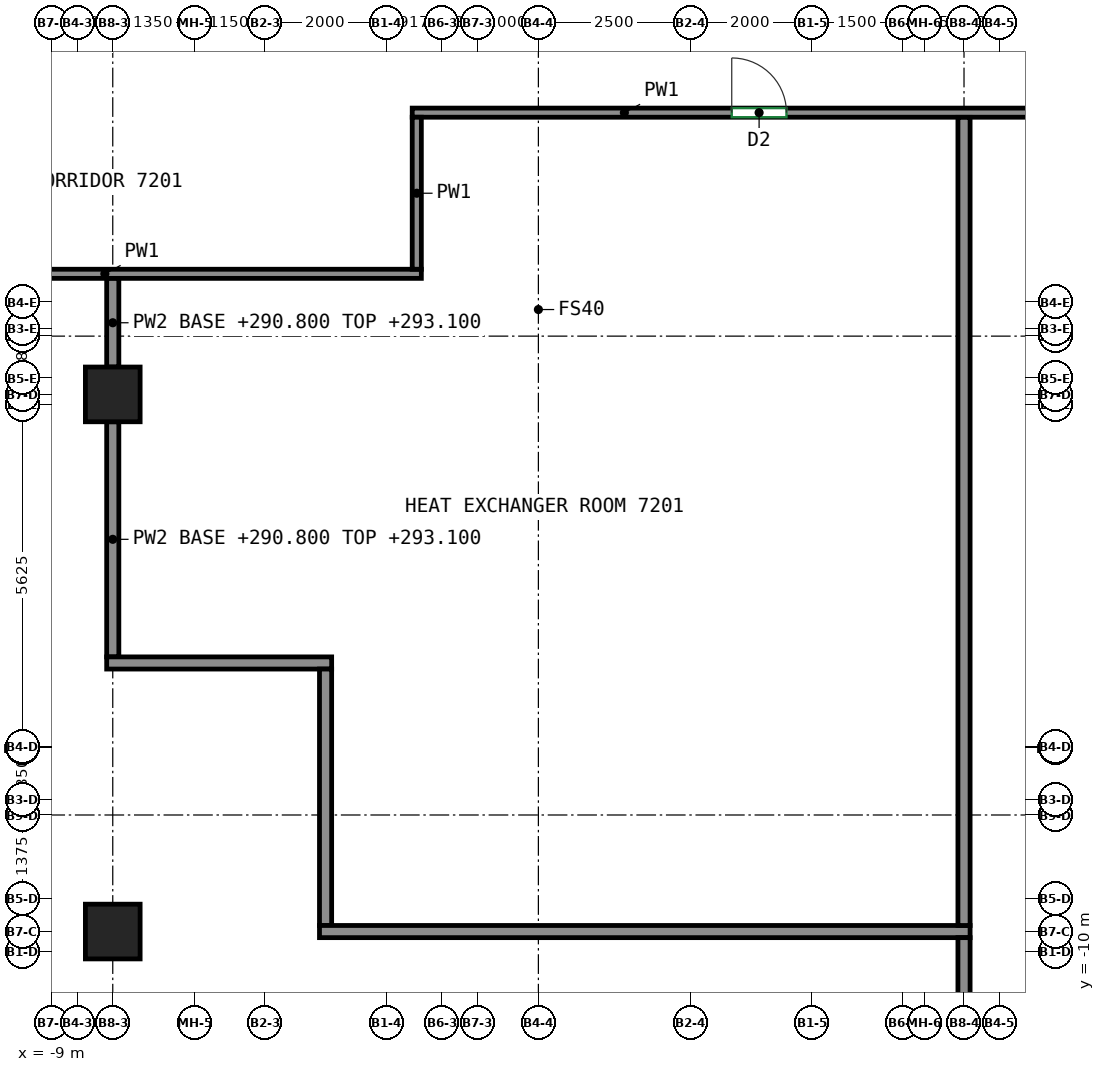
"""IFC4 building model, lengths in metres.
Left out: names, types, materials, properties, quantities, classifications, styles, units other than length and angle.
Written with IfcOpenShell. Run it as: python <this file> out.ifc"""

import sys

from ifc_helpers import new_model, si_unit, direction, frame, frame_2d, origin, origin_2d, place, context, subcontext, project, spatial, rectangle, extrude, source, transform, mapped, element, fill, save


model = new_model("IFC4")
c1 = context("Model", 3, precision=1e-05, world=origin(), true_north=direction((0.0, 1.0)))
c2 = subcontext(c1, "Body", "Model", "MODEL_VIEW")
j1 = project(units=[si_unit("LENGTHUNIT", "METRE"), si_unit("PLANEANGLEUNIT", "RADIAN")], contexts=[c1])
p1 = place(None, origin())
s1 = spatial("IfcSite", under=j1, at=p1, CompositionType="ELEMENT")
p2 = place(p1, origin())
s2 = spatial("IfcBuilding", under=s1, at=p2, CompositionType="ELEMENT")
p3 = place(p2, frame((0.0, 0.0, 290.8)))
s3 = spatial("IfcBuildingStorey", under=s2, at=p3, CompositionType="ELEMENT", Elevation=290.8)
m1 = source(origin(), c2, "Body", "SweptSolid", [
    extrude(rectangle(XDim=0.9, YDim=0.9, at=origin_2d()), origin(), (0.0, 0.0, 1.0), 2.3),
])
for number, where, z_axis, x_axis in (
    (1, (-8.0, -9.667, 0.0), (0.0, 0.0, 1.0), (1.0, 0.0, 0.0)),
    (2, (-8.0, -0.833, 0.0), (0.0, 0.0, 1.0), (1.0, 0.0, 0.0)),
):
    element("IfcColumn", number, at=place(p3, frame(where, z_axis=z_axis, x_axis=x_axis)), inside=s3, PredefinedType="COLUMN", context=c2, shape_type="MappedRepresentation", body=[
        mapped(m1, transform((0.0, 0.0, 0.0))),
    ])
p4 = place(p3, frame((-13.335, 1.15, 0.0), z_axis=(0.0, 0.0, 1.0), x_axis=(1.0, 0.0, 0.0)))
e3 = element("IfcWall", 3, at=p4, inside=s3, PredefinedType="PARTITIONING", context=c2, shape_type="SweptSolid", body=[
    extrude(rectangle(XDim=10.41, YDim=0.15, at=frame_2d((5.205, 0.0))), origin(), (0.0, 0.0, 1.0), 3.8),
])
p5 = place(p3, frame((-3.075, 3.8, 0.0), z_axis=(0.0, 0.0, 1.0), x_axis=(1.0, 0.0, 0.0)))
e4 = element("IfcWall", 4, at=p5, inside=s3, PredefinedType="PARTITIONING", context=c2, shape_type="SweptSolid", body=[
    extrude(rectangle(XDim=11.63, YDim=0.15, at=frame_2d((5.815, 0.0))), origin(), (0.0, 0.0, 1.0), 3.8),
])
p6 = place(p5, frame((5.255, 0.0, 0.0)))
e5 = element("IfcOpeningElement", 5, at=p6, cuts=e4, PredefinedType="OPENING", context=c2, shape_type="SweptSolid", body=[
    extrude(rectangle(XDim=0.9, YDim=2.1, at=frame_2d((0.45, 1.05))), frame((0.0, 0.085, 0.0), z_axis=(0.0, -1.0, 0.0), x_axis=(1.0, 0.0, 0.0)), (0.0, 0.0, 1.0), 0.17),
])
p7 = place(p3, frame((-3.0, 1.225, 0.0), z_axis=(0.0, 0.0, 1.0), x_axis=(0.0, 1.0, 0.0)))
e6 = element("IfcWall", 6, at=p7, inside=s3, PredefinedType="PARTITIONING", context=c2, shape_type="SweptSolid", body=[
    extrude(rectangle(XDim=2.5, YDim=0.15, at=frame_2d((1.25, 0.0))), origin(), (0.0, 0.0, 1.0), 3.8),
])
p8 = place(p3, frame((-8.0, -0.383, 0.0), z_axis=(0.0, 0.0, 1.0), x_axis=(0.0, 1.0, 0.0)))
e7 = element("IfcWall", 7, at=p8, inside=s3, PredefinedType="PARTITIONING", context=c2, shape_type="SweptSolid", body=[
    extrude(rectangle(XDim=1.456, YDim=0.2, at=frame_2d((0.728, 0.0))), origin(), (0.0, 0.0, 1.0), 2.3),
])
p9 = place(p3, frame((-8.0, -5.15, 0.0), z_axis=(0.0, 0.0, 1.0), x_axis=(0.0, 1.0, 0.0)))
e8 = element("IfcWall", 8, at=p9, inside=s3, PredefinedType="PARTITIONING", context=c2, shape_type="SweptSolid", body=[
    extrude(rectangle(XDim=3.867, YDim=0.2, at=frame_2d((1.934, 0.0))), origin(), (0.0, 0.0, 1.0), 2.3),
])
p10 = place(p3, frame((-4.4, -5.25, 0.0), z_axis=(0.0, 0.0, 1.0), x_axis=(-1.0, 0.0, 0.0)))
e9 = element("IfcWall", 9, at=p10, inside=s3, PredefinedType="PARTITIONING", context=c2, shape_type="SweptSolid", body=[
    extrude(rectangle(XDim=3.7, YDim=0.2, at=frame_2d((1.85, 0.0))), origin(), (0.0, 0.0, 1.0), 3.8),
])
p11 = place(p3, frame((-4.5, -9.567, 0.0), z_axis=(0.0, 0.0, 1.0), x_axis=(0.0, 1.0, 0.0)))
e10 = element("IfcWall", 10, at=p11, inside=s3, PredefinedType="PARTITIONING", context=c2, shape_type="SweptSolid", body=[
    extrude(rectangle(XDim=4.217, YDim=0.2, at=frame_2d((2.108, 0.0))), origin(), (0.0, 0.0, 1.0), 3.8),
])
p12 = place(p3, frame((-4.6, -9.667, 0.0), z_axis=(0.0, 0.0, 1.0), x_axis=(1.0, 0.0, 0.0)))
e11 = element("IfcWall", 11, at=p12, inside=s3, PredefinedType="PARTITIONING", context=c2, shape_type="SweptSolid", body=[
    extrude(rectangle(XDim=10.7, YDim=0.2, at=frame_2d((5.35, 0.0))), origin(), (0.0, 0.0, 1.0), 3.8),
])
p13 = place(p3, frame((6.0, -17.725, 0.0), z_axis=(0.0, 0.0, 1.0), x_axis=(0.0, 1.0, 0.0)))
e12 = element("IfcWall", 12, at=p13, inside=s3, PredefinedType="PARTITIONING", context=c2, shape_type="SweptSolid", body=[
    extrude(rectangle(XDim=7.958, YDim=0.2, at=frame_2d((3.979, 0.0))), origin(), (0.0, 0.0, 1.0), 3.8),
])
p14 = place(p3, frame((6.0, -9.567, 0.0), z_axis=(0.0, 0.0, 1.0), x_axis=(0.0, 1.0, 0.0)))
e13 = element("IfcWall", 13, at=p14, inside=s3, PredefinedType="PARTITIONING", context=c2, shape_type="SweptSolid", body=[
    extrude(rectangle(XDim=13.29, YDim=0.2, at=frame_2d((6.645, 0.0))), origin(), (0.0, 0.0, 1.0), 3.8),
])
p15 = place(p6, origin())
e14 = element("IfcDoor", 14, at=p15, inside=s3, OperationType="SINGLE_SWING_LEFT", PredefinedType="DOOR", context=c2, shape_type="SweptSolid", body=[
    extrude(rectangle(XDim=0.9, YDim=2.1, at=frame_2d((0.45, 1.05))), frame((0.0, 0.025, 0.0), z_axis=(0.0, -1.0, 0.0), x_axis=(1.0, 0.0, 0.0)), (0.0, 0.0, 1.0), 0.05),
])
fill(e5, e14)
save(model, sys.argv[1])
